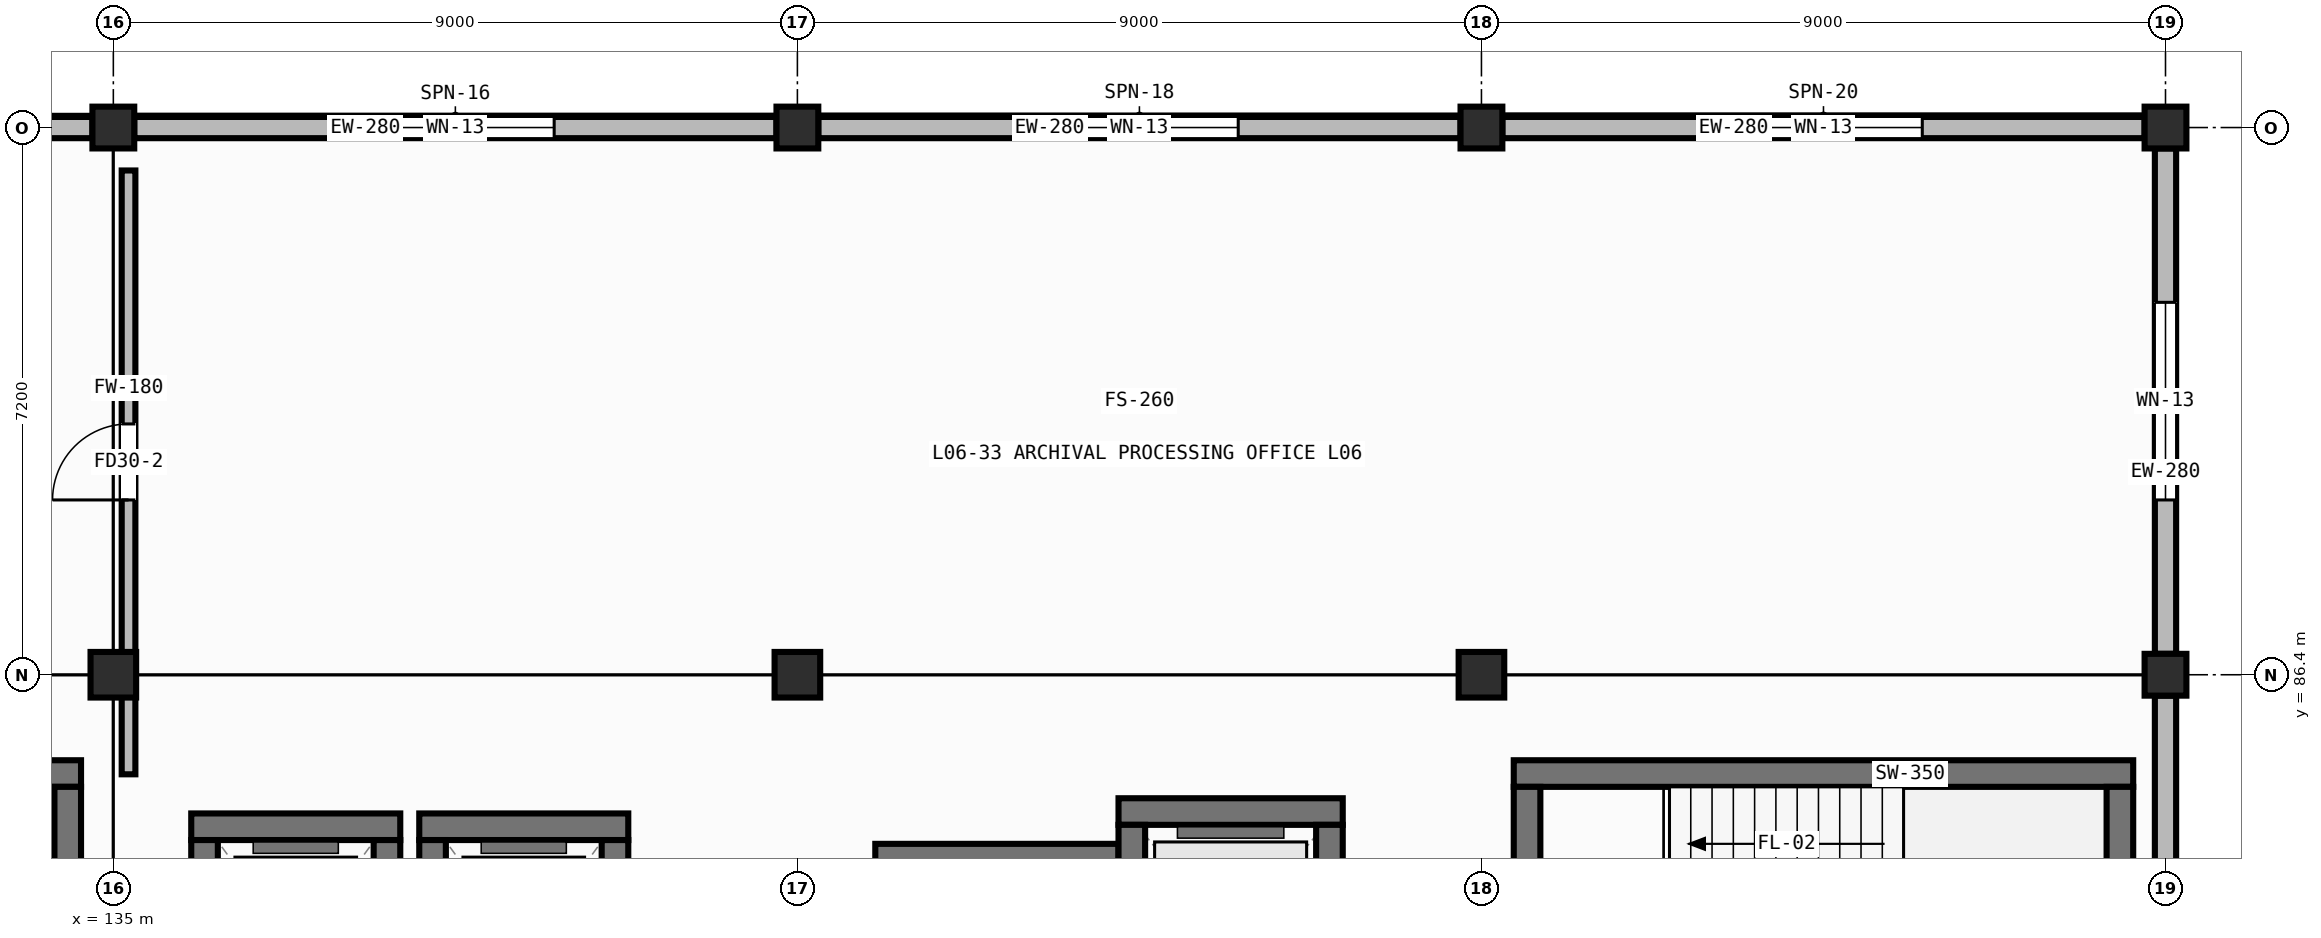
"""IFC4 building model, lengths in metres.
Left out: names, types, materials, properties, quantities, classifications, styles, units other than length and angle.
Written with IfcOpenShell. Run it as: python <this file> out.ifc"""

import sys

from ifc_helpers import new_model, si_unit, direction, frame, frame_2d, origin, origin_2d, place, context, subcontext, project, spatial, rectangle, hollow_rectangle, extrude, element, fill, save


model = new_model("IFC4")
c1 = context("Model", 3, precision=1e-05, world=origin(), true_north=direction((0.0, 1.0)))
c2 = subcontext(c1, "Body", "Model", "MODEL_VIEW")
j1 = project(units=[si_unit("LENGTHUNIT", "METRE"), si_unit("PLANEANGLEUNIT", "RADIAN")], contexts=[c1])
p1 = place(None, origin())
s1 = spatial("IfcSite", under=j1, at=p1, CompositionType="ELEMENT")
p2 = place(p1, origin())
s2 = spatial("IfcBuilding", under=s1, at=p2, CompositionType="ELEMENT")
p3 = place(p2, frame((0.0, 0.0, 20.6)))
s3 = spatial("IfcBuildingStorey", under=s2, at=p3, CompositionType="ELEMENT", Elevation=20.6)
p4 = place(p3, frame((135.0, 86.4, 0.0), z_axis=(0.0, 0.0, 1.0), x_axis=(1.0, 0.0, 0.0)))
e1 = element("IfcColumn", 1, at=p4, inside=s3, PredefinedType="COLUMN", context=c2, shape_type="SweptSolid", body=[
    extrude(hollow_rectangle(XDim=0.6, YDim=0.6, WallThickness=0.025, at=origin_2d()), origin(), (0.0, 0.0, 1.0), 3.6),
])
p5 = place(p3, frame((135.0, 93.6, 0.0), z_axis=(0.0, 0.0, 1.0), x_axis=(1.0, 0.0, 0.0)))
e2 = element("IfcColumn", 2, at=p5, inside=s3, PredefinedType="COLUMN", context=c2, shape_type="SweptSolid", body=[
    extrude(hollow_rectangle(XDim=0.55, YDim=0.55, WallThickness=0.022, at=origin_2d()), origin(), (0.0, 0.0, 1.0), 3.6),
])
p6 = place(p3, frame((144.0, 86.4, 0.0), z_axis=(0.0, 0.0, 1.0), x_axis=(1.0, 0.0, 0.0)))
e3 = element("IfcColumn", 3, at=p6, inside=s3, PredefinedType="COLUMN", context=c2, shape_type="SweptSolid", body=[
    extrude(hollow_rectangle(XDim=0.6, YDim=0.6, WallThickness=0.025, at=origin_2d()), origin(), (0.0, 0.0, 1.0), 3.6),
])
p7 = place(p3, frame((144.0, 93.6, 0.0), z_axis=(0.0, 0.0, 1.0), x_axis=(1.0, 0.0, 0.0)))
e4 = element("IfcColumn", 4, at=p7, inside=s3, PredefinedType="COLUMN", context=c2, shape_type="SweptSolid", body=[
    extrude(hollow_rectangle(XDim=0.55, YDim=0.55, WallThickness=0.022, at=origin_2d()), origin(), (0.0, 0.0, 1.0), 3.6),
])
p8 = place(p3, frame((153.0, 86.4, 0.0), z_axis=(0.0, 0.0, 1.0), x_axis=(1.0, 0.0, 0.0)))
e5 = element("IfcColumn", 5, at=p8, inside=s3, PredefinedType="COLUMN", context=c2, shape_type="SweptSolid", body=[
    extrude(hollow_rectangle(XDim=0.6, YDim=0.6, WallThickness=0.025, at=origin_2d()), origin(), (0.0, 0.0, 1.0), 3.6),
])
for number, where, z_axis, x_axis in (
    (6, (153.0, 93.6, 0.0), (0.0, 0.0, 1.0), (1.0, 0.0, 0.0)),
    (7, (162.0, 86.4, 0.0), (0.0, 0.0, 1.0), (1.0, 0.0, 0.0)),
    (8, (162.0, 93.6, 0.0), (0.0, 0.0, 1.0), (1.0, 0.0, 0.0)),
):
    element("IfcColumn", number, at=place(p3, frame(where, z_axis=z_axis, x_axis=x_axis)), inside=s3, PredefinedType="COLUMN", context=c2, shape_type="SweptSolid", body=[
        extrude(hollow_rectangle(XDim=0.55, YDim=0.55, WallThickness=0.022, at=origin_2d()), origin(), (0.0, 0.0, 1.0), 3.6),
    ])
p9 = place(p3, frame((134.725, 93.6, 0.0), z_axis=(0.0, 0.0, 1.0), x_axis=(-1.0, 0.0, 0.0)))
e9 = element("IfcWall", 9, at=p9, inside=s3, PredefinedType="STANDARD", context=c2, shape_type="SweptSolid", body=[
    extrude(rectangle(XDim=8.45, YDim=0.28, at=frame_2d((4.225, 0.0))), origin(), (0.0, 0.0, 1.0), 2.92),
])
p10 = place(p3, frame((143.725, 93.6, 0.0), z_axis=(0.0, 0.0, 1.0), x_axis=(-1.0, 0.0, 0.0)))
e10 = element("IfcWall", 10, at=p10, inside=s3, PredefinedType="STANDARD", context=c2, shape_type="SweptSolid", body=[
    extrude(rectangle(XDim=8.45, YDim=0.28, at=frame_2d((4.225, 0.0))), origin(), (0.0, 0.0, 1.0), 2.92),
])
p11 = place(p10, frame((2.925, 0.0, 0.85)))
e11 = element("IfcOpeningElement", 11, at=p11, cuts=e10, PredefinedType="OPENING", context=c2, shape_type="SweptSolid", body=[
    extrude(rectangle(XDim=2.6, YDim=1.6, at=frame_2d((1.3, 0.8))), frame((0.0, 0.152, 0.0), z_axis=(0.0, -1.0, 0.0), x_axis=(1.0, 0.0, 0.0)), (0.0, 0.0, 1.0), 0.304),
])
p12 = place(p3, frame((152.725, 93.6, 0.0), z_axis=(0.0, 0.0, 1.0), x_axis=(-1.0, 0.0, 0.0)))
e12 = element("IfcWall", 12, at=p12, inside=s3, PredefinedType="STANDARD", context=c2, shape_type="SweptSolid", body=[
    extrude(rectangle(XDim=8.45, YDim=0.28, at=frame_2d((4.225, 0.0))), origin(), (0.0, 0.0, 1.0), 2.92),
])
p13 = place(p12, frame((2.925, 0.0, 0.85)))
e13 = element("IfcOpeningElement", 13, at=p13, cuts=e12, PredefinedType="OPENING", context=c2, shape_type="SweptSolid", body=[
    extrude(rectangle(XDim=2.6, YDim=1.6, at=frame_2d((1.3, 0.8))), frame((0.0, 0.152, 0.0), z_axis=(0.0, -1.0, 0.0), x_axis=(1.0, 0.0, 0.0)), (0.0, 0.0, 1.0), 0.304),
])
p14 = place(p3, frame((161.725, 93.6, 0.0), z_axis=(0.0, 0.0, 1.0), x_axis=(-1.0, 0.0, 0.0)))
e14 = element("IfcWall", 14, at=p14, inside=s3, PredefinedType="STANDARD", context=c2, shape_type="SweptSolid", body=[
    extrude(rectangle(XDim=8.45, YDim=0.28, at=frame_2d((4.225, 0.0))), origin(), (0.0, 0.0, 1.0), 2.92),
])
p15 = place(p14, frame((2.925, 0.0, 0.85)))
e15 = element("IfcOpeningElement", 15, at=p15, cuts=e14, PredefinedType="OPENING", context=c2, shape_type="SweptSolid", body=[
    extrude(rectangle(XDim=2.6, YDim=1.6, at=frame_2d((1.3, 0.8))), frame((0.0, 0.152, 0.0), z_axis=(0.0, -1.0, 0.0), x_axis=(1.0, 0.0, 0.0)), (0.0, 0.0, 1.0), 0.304),
])
p16 = place(p3, frame((162.0, 86.125, 0.0), z_axis=(0.0, 0.0, 1.0), x_axis=(0.0, -1.0, 0.0)))
e16 = element("IfcWall", 16, at=p16, inside=s3, PredefinedType="STANDARD", context=c2, shape_type="SweptSolid", body=[
    extrude(rectangle(XDim=6.65, YDim=0.28, at=frame_2d((3.325, 0.0))), origin(), (0.0, 0.0, 1.0), 2.92),
])
p17 = place(p3, frame((162.0, 93.325, 0.0), z_axis=(0.0, 0.0, 1.0), x_axis=(0.0, -1.0, 0.0)))
e17 = element("IfcWall", 17, at=p17, inside=s3, PredefinedType="STANDARD", context=c2, shape_type="SweptSolid", body=[
    extrude(rectangle(XDim=6.65, YDim=0.28, at=frame_2d((3.325, 0.0))), origin(), (0.0, 0.0, 1.0), 2.92),
])
p18 = place(p17, frame((2.025, 0.0, 0.85)))
e18 = element("IfcOpeningElement", 18, at=p18, cuts=e17, PredefinedType="OPENING", context=c2, shape_type="SweptSolid", body=[
    extrude(rectangle(XDim=2.6, YDim=1.6, at=frame_2d((1.3, 0.8))), frame((0.0, 0.152, 0.0), z_axis=(0.0, -1.0, 0.0), x_axis=(1.0, 0.0, 0.0)), (0.0, 0.0, 1.0), 0.304),
])
p19 = place(p3, frame((126.425, 85.1, 0.0), z_axis=(0.0, 0.0, 1.0), x_axis=(1.0, 0.0, 0.0)))
e19 = element("IfcWall", 19, at=p19, inside=s3, PredefinedType="SHEAR", context=c2, shape_type="SweptSolid", body=[
    extrude(rectangle(XDim=8.15, YDim=0.35, at=frame_2d((4.075, 0.0))), origin(), (0.0, 0.0, 1.0), 3.32),
])
p20 = place(p3, frame((134.4, 81.375, 0.0), z_axis=(0.0, 0.0, 1.0), x_axis=(0.0, 1.0, 0.0)))
e20 = element("IfcWall", 20, at=p20, inside=s3, PredefinedType="SHEAR", context=c2, shape_type="SweptSolid", body=[
    extrude(rectangle(XDim=3.55, YDim=0.35, at=frame_2d((1.775, 0.0))), origin(), (0.0, 0.0, 1.0), 3.32),
])
p21 = place(p3, frame((153.425, 85.1, 0.0), z_axis=(0.0, 0.0, 1.0), x_axis=(1.0, 0.0, 0.0)))
e21 = element("IfcWall", 21, at=p21, inside=s3, PredefinedType="SHEAR", context=c2, shape_type="SweptSolid", body=[
    extrude(rectangle(XDim=8.15, YDim=0.35, at=frame_2d((4.075, 0.0))), origin(), (0.0, 0.0, 1.0), 3.32),
])
for number, where, z_axis, x_axis in (
    (22, (153.6, 81.375, 0.0), (0.0, 0.0, 1.0), (0.0, 1.0, 0.0)),
    (23, (161.4, 81.375, 0.0), (0.0, 0.0, 1.0), (0.0, 1.0, 0.0)),
):
    element("IfcWall", number, at=place(p3, frame(where, z_axis=z_axis, x_axis=x_axis)), inside=s3, PredefinedType="SHEAR", context=c2, shape_type="SweptSolid", body=[
        extrude(rectangle(XDim=3.55, YDim=0.35, at=frame_2d((1.775, 0.0))), origin(), (0.0, 0.0, 1.0), 3.32),
    ])
p22 = place(p3, frame((136.025, 84.4, 0.0), z_axis=(0.0, 0.0, 1.0), x_axis=(1.0, 0.0, 0.0)))
e24 = element("IfcWall", 24, at=p22, inside=s3, PredefinedType="SHEAR", context=c2, shape_type="SweptSolid", body=[
    extrude(rectangle(XDim=2.75, YDim=0.35, at=frame_2d((1.375, 0.0))), origin(), (0.0, 0.0, 1.0), 3.32),
])
for number, where, z_axis, x_axis in (
    (25, (136.2, 81.375, 0.0), (0.0, 0.0, 1.0), (0.0, 1.0, 0.0)),
    (26, (138.6, 81.375, 0.0), (0.0, 0.0, 1.0), (0.0, 1.0, 0.0)),
):
    element("IfcWall", number, at=place(p3, frame(where, z_axis=z_axis, x_axis=x_axis)), inside=s3, PredefinedType="SHEAR", context=c2, shape_type="SweptSolid", body=[
        extrude(rectangle(XDim=2.85, YDim=0.35, at=frame_2d((1.425, 0.0))), origin(), (0.0, 0.0, 1.0), 3.32),
    ])
p23 = place(p3, frame((139.025, 84.4, 0.0), z_axis=(0.0, 0.0, 1.0), x_axis=(1.0, 0.0, 0.0)))
e27 = element("IfcWall", 27, at=p23, inside=s3, PredefinedType="SHEAR", context=c2, shape_type="SweptSolid", body=[
    extrude(rectangle(XDim=2.75, YDim=0.35, at=frame_2d((1.375, 0.0))), origin(), (0.0, 0.0, 1.0), 3.32),
])
for number, where, z_axis, x_axis in (
    (28, (139.2, 81.375, 0.0), (0.0, 0.0, 1.0), (0.0, 1.0, 0.0)),
    (29, (141.6, 81.375, 0.0), (0.0, 0.0, 1.0), (0.0, 1.0, 0.0)),
):
    element("IfcWall", number, at=place(p3, frame(where, z_axis=z_axis, x_axis=x_axis)), inside=s3, PredefinedType="SHEAR", context=c2, shape_type="SweptSolid", body=[
        extrude(rectangle(XDim=2.85, YDim=0.35, at=frame_2d((1.425, 0.0))), origin(), (0.0, 0.0, 1.0), 3.32),
    ])
p24 = place(p3, frame((145.025, 84.0, 0.0), z_axis=(0.0, 0.0, 1.0), x_axis=(1.0, 0.0, 0.0)))
e30 = element("IfcWall", 30, at=p24, inside=s3, PredefinedType="SHEAR", context=c2, shape_type="SweptSolid", body=[
    extrude(rectangle(XDim=3.2, YDim=0.35, at=frame_2d((1.6, 0.0))), origin(), (0.0, 0.0, 1.0), 3.32),
])
p25 = place(p3, frame((148.225, 84.6, 0.0), z_axis=(0.0, 0.0, 1.0), x_axis=(1.0, 0.0, 0.0)))
e31 = element("IfcWall", 31, at=p25, inside=s3, PredefinedType="SHEAR", context=c2, shape_type="SweptSolid", body=[
    extrude(rectangle(XDim=2.95, YDim=0.35, at=frame_2d((1.475, 0.0))), origin(), (0.0, 0.0, 1.0), 3.32),
])
for number, where, z_axis, x_axis in (
    (32, (148.4, 81.375, 0.0), (0.0, 0.0, 1.0), (0.0, 1.0, 0.0)),
    (33, (151.0, 81.375, 0.0), (0.0, 0.0, 1.0), (0.0, 1.0, 0.0)),
):
    element("IfcWall", number, at=place(p3, frame(where, z_axis=z_axis, x_axis=x_axis)), inside=s3, PredefinedType="SHEAR", context=c2, shape_type="SweptSolid", body=[
        extrude(rectangle(XDim=3.05, YDim=0.35, at=frame_2d((1.525, 0.0))), origin(), (0.0, 0.0, 1.0), 3.32),
    ])
p26 = place(p3, frame((135.2, 85.09, 0.0), z_axis=(0.0, 0.0, 1.0), x_axis=(0.0, 1.0, 0.0)))
e34 = element("IfcWall", 34, at=p26, inside=s3, PredefinedType="PARTITIONING", context=c2, shape_type="SweptSolid", body=[
    extrude(rectangle(XDim=7.945, YDim=0.18, at=frame_2d((3.972, 0.0))), origin(), (0.0, 0.0, 1.0), 2.6),
])
p27 = place(p26, frame((3.61, 0.0, 0.0)))
e35 = element("IfcOpeningElement", 35, at=p27, cuts=e34, PredefinedType="OPENING", context=c2, shape_type="SweptSolid", body=[
    extrude(rectangle(XDim=1.0, YDim=2.08, at=frame_2d((0.5, 1.04))), frame((0.0, 0.102, 0.0), z_axis=(0.0, -1.0, 0.0), x_axis=(1.0, 0.0, 0.0)), (0.0, 0.0, 1.0), 0.204),
])
p28 = place(p11, origin())
e36 = element("IfcWindow", 36, at=p28, inside=s3, PartitioningType="DOUBLE_PANEL_VERTICAL", PredefinedType="WINDOW", context=c2, shape_type="SweptSolid", body=[
    extrude(rectangle(XDim=2.6, YDim=1.6, at=frame_2d((1.3, 0.8))), frame((0.0, 0.03, 0.0), z_axis=(0.0, -1.0, 0.0), x_axis=(1.0, 0.0, 0.0)), (0.0, 0.0, 1.0), 0.06),
])
fill(e11, e36)
p29 = place(p13, origin())
e37 = element("IfcWindow", 37, at=p29, inside=s3, PartitioningType="DOUBLE_PANEL_VERTICAL", PredefinedType="WINDOW", context=c2, shape_type="SweptSolid", body=[
    extrude(rectangle(XDim=2.6, YDim=1.6, at=frame_2d((1.3, 0.8))), frame((0.0, 0.03, 0.0), z_axis=(0.0, -1.0, 0.0), x_axis=(1.0, 0.0, 0.0)), (0.0, 0.0, 1.0), 0.06),
])
fill(e13, e37)
p30 = place(p15, origin())
e38 = element("IfcWindow", 38, at=p30, inside=s3, PartitioningType="DOUBLE_PANEL_VERTICAL", PredefinedType="WINDOW", context=c2, shape_type="SweptSolid", body=[
    extrude(rectangle(XDim=2.6, YDim=1.6, at=frame_2d((1.3, 0.8))), frame((0.0, 0.03, 0.0), z_axis=(0.0, -1.0, 0.0), x_axis=(1.0, 0.0, 0.0)), (0.0, 0.0, 1.0), 0.06),
])
fill(e15, e38)
p31 = place(p18, origin())
e39 = element("IfcWindow", 39, at=p31, inside=s3, PartitioningType="DOUBLE_PANEL_VERTICAL", PredefinedType="WINDOW", context=c2, shape_type="SweptSolid", body=[
    extrude(rectangle(XDim=2.6, YDim=1.6, at=frame_2d((1.3, 0.8))), frame((0.0, 0.03, 0.0), z_axis=(0.0, -1.0, 0.0), x_axis=(1.0, 0.0, 0.0)), (0.0, 0.0, 1.0), 0.06),
])
fill(e18, e39)
p32 = place(p27, origin())
e40 = element("IfcDoor", 40, at=p32, inside=s3, OperationType="SINGLE_SWING_LEFT", PredefinedType="DOOR", context=c2, shape_type="SweptSolid", body=[
    extrude(rectangle(XDim=1.0, YDim=2.08, at=frame_2d((0.5, 1.04))), frame((0.0, 0.025, 0.0), z_axis=(0.0, -1.0, 0.0), x_axis=(1.0, 0.0, 0.0)), (0.0, 0.0, 1.0), 0.05),
])
fill(e35, e40)
save(model, sys.argv[1])
